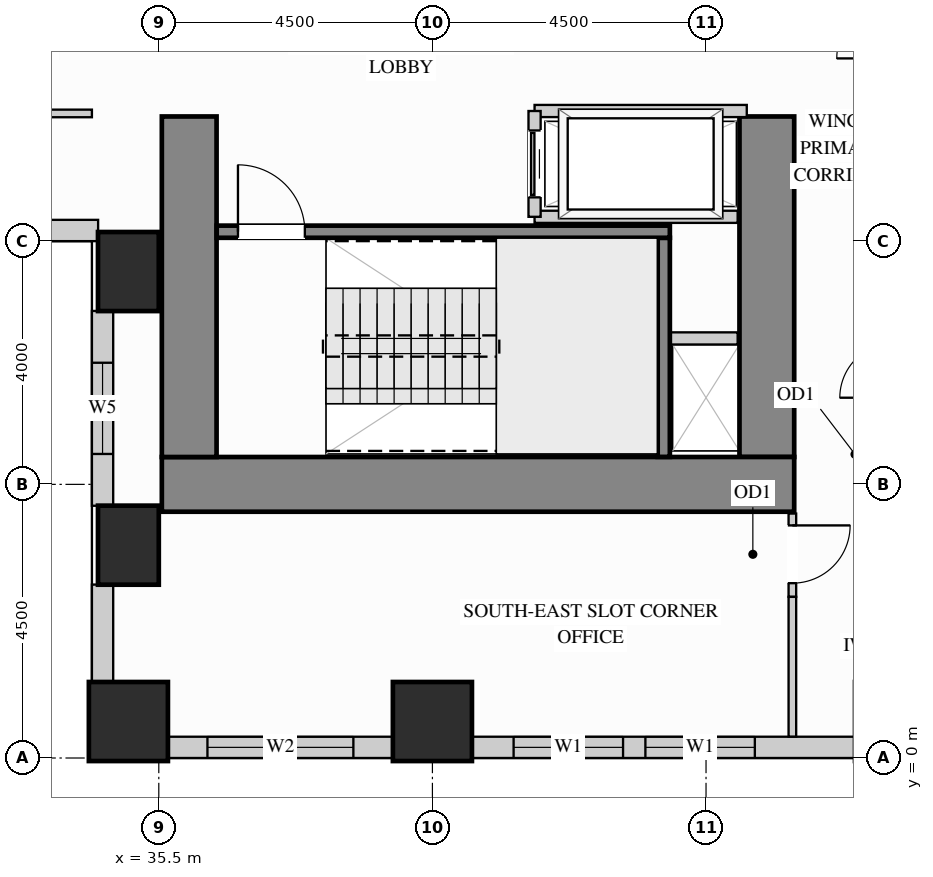
"""IFC4 building model, lengths in metres.
Left out: names, types, materials, properties, quantities, classifications, styles, units other than length and angle.
Written with IfcOpenShell. Run it as: python <this file> out.ifc"""

import sys

from ifc_helpers import new_model, si_unit, direction, frame, frame_2d, origin, origin_2d, place, context, subcontext, project, spatial, rectangle, extrude, source, transform, mapped, element, fill, save


model = new_model("IFC4")
c1 = context("Model", 3, precision=1e-05, world=origin(), true_north=direction((0.0, 1.0)))
c2 = subcontext(c1, "Body", "Model", "MODEL_VIEW")
j1 = project(units=[si_unit("LENGTHUNIT", "METRE"), si_unit("PLANEANGLEUNIT", "RADIAN")], contexts=[c1])
p1 = place(None, origin())
s1 = spatial("IfcSite", under=j1, at=p1, CompositionType="ELEMENT")
p2 = place(p1, origin())
s2 = spatial("IfcBuilding", under=s1, at=p2, CompositionType="ELEMENT")
p3 = place(p2, frame((0.0, 0.0, 36.9)))
s3 = spatial("IfcBuildingStorey", under=s2, at=p3, CompositionType="ELEMENT", Elevation=36.9)
m1 = source(origin(), c2, "Body", "SweptSolid", [
    extrude(rectangle(XDim=1.0, YDim=1.3, at=origin_2d()), origin(), (0.0, 0.0, 1.0), 3.38),
])
for number, where, z_axis, x_axis in (
    (1, (35.0, 3.5, 0.0), (0.0, 0.0, 1.0), (1.0, 0.0, 0.0)),
    (2, (35.0, 8.0, 0.0), (0.0, 0.0, 1.0), (1.0, 0.0, 0.0)),
):
    element("IfcColumn", number, at=place(p3, frame(where, z_axis=z_axis, x_axis=x_axis)), inside=s3, PredefinedType="COLUMN", context=c2, shape_type="MappedRepresentation", body=[
        mapped(m1, transform((0.0, 0.0, 0.0), x_axis=(1.0, 0.0, 0.0), y_axis=(0.0, 1.0, 0.0), z_axis=(0.0, 0.0, 1.0))),
    ])
m2 = source(origin(), c2, "Body", "SweptSolid", [
    extrude(rectangle(XDim=1.3, YDim=1.3, at=origin_2d()), origin(), (0.0, 0.0, 1.0), 3.38),
])
for number, where, z_axis, x_axis in (
    (3, (35.0, 0.6, 0.0), (0.0, 0.0, 1.0), (1.0, 0.0, 0.0)),
    (4, (40.0, 0.6, 0.0), (0.0, 0.0, 1.0), (1.0, 0.0, 0.0)),
):
    element("IfcColumn", number, at=place(p3, frame(where, z_axis=z_axis, x_axis=x_axis)), inside=s3, PredefinedType="COLUMN", context=c2, shape_type="MappedRepresentation", body=[
        mapped(m2, transform((0.0, 0.0, 0.0), x_axis=(1.0, 0.0, 0.0), y_axis=(0.0, 1.0, 0.0), z_axis=(0.0, 0.0, 1.0))),
    ])
m3 = source(origin(), c2, "Body", "SweptSolid", [
    extrude(rectangle(XDim=5.6, YDim=0.9, at=frame_2d((2.8, 0.0))), origin(), (0.0, 0.0, 1.0), 3.38),
])
p4 = place(p3, frame((45.5, 4.95, 0.0), z_axis=(0.0, 0.0, 1.0), x_axis=(0.0, 1.0, 0.0)))
e5 = element("IfcWall", 5, at=p4, inside=s3, PredefinedType="SHEAR", context=c2, shape_type="MappedRepresentation", body=[
    mapped(m3, transform((0.0, 0.0, 0.0), x_axis=(1.0, 0.0, 0.0), y_axis=(0.0, 1.0, 0.0), z_axis=(0.0, 0.0, 1.0))),
])
m4 = source(origin(), c2, "Body", "SweptSolid", [
    extrude(rectangle(XDim=10.4, YDim=0.9, at=frame_2d((5.2, 0.0))), origin(), (0.0, 0.0, 1.0), 3.38),
])
p5 = place(p3, frame((35.55, 4.5, 0.0), z_axis=(0.0, 0.0, 1.0), x_axis=(1.0, 0.0, 0.0)))
e6 = element("IfcWall", 6, at=p5, inside=s3, PredefinedType="SHEAR", context=c2, shape_type="MappedRepresentation", body=[
    mapped(m4, transform((0.0, 0.0, 0.0), x_axis=(1.0, 0.0, 0.0), y_axis=(0.0, 1.0, 0.0), z_axis=(0.0, 0.0, 1.0))),
])
p6 = place(p3, frame((36.0, 4.95, 0.0), z_axis=(0.0, 0.0, 1.0), x_axis=(0.0, 1.0, 0.0)))
e7 = element("IfcWall", 7, at=p6, inside=s3, PredefinedType="SHEAR", context=c2, shape_type="MappedRepresentation", body=[
    mapped(m3, transform((0.0, 0.0, 0.0), x_axis=(1.0, 0.0, 0.0), y_axis=(0.0, 1.0, 0.0), z_axis=(0.0, 0.0, 1.0))),
])
p7 = place(p3, frame((30.998, 8.675, 0.0), z_axis=(0.0, 0.0, 1.0), x_axis=(1.0, 0.0, 0.0)))
e8 = element("IfcWall", 8, at=p7, inside=s3, PredefinedType="SOLIDWALL", context=c2, shape_type="SweptSolid", body=[
    extrude(rectangle(XDim=3.504, YDim=0.35, at=frame_2d((1.752, 0.0))), origin(), (0.0, 0.0, 1.0), 3.365),
])
p8 = place(p7, frame((1.002, 0.0, 0.78)))
e9 = element("IfcOpeningElement", 9, at=p8, cuts=e8, PredefinedType="OPENING", context=c2, shape_type="SweptSolid", body=[
    extrude(rectangle(XDim=1.5, YDim=2.0, at=frame_2d((0.75, 1.0))), frame((0.0, 0.185, 0.0), z_axis=(0.0, -1.0, 0.0), x_axis=(1.0, 0.0, 0.0)), (0.0, 0.0, 1.0), 0.37),
])
p9 = place(p3, frame((34.575, 7.352, 0.0), z_axis=(0.0, 0.0, 1.0), x_axis=(0.0, -1.0, 0.0)))
e10 = element("IfcWall", 10, at=p9, inside=s3, PredefinedType="SOLIDWALL", context=c2, shape_type="SweptSolid", body=[
    extrude(rectangle(XDim=3.204, YDim=0.35, at=frame_2d((1.602, 0.0))), origin(), (0.0, 0.0, 1.0), 2.51),
])
p10 = place(p9, frame((0.852, 0.0, 0.78)))
e11 = element("IfcOpeningElement", 11, at=p10, cuts=e10, PredefinedType="OPENING", context=c2, shape_type="SweptSolid", body=[
    extrude(rectangle(XDim=1.5, YDim=1.55, at=frame_2d((0.75, 0.775))), frame((0.0, 0.185, 0.0), z_axis=(0.0, -1.0, 0.0), x_axis=(1.0, 0.0, 0.0)), (0.0, 0.0, 1.0), 0.37),
])
m5 = source(origin(), c2, "Body", "SweptSolid", [
    extrude(rectangle(XDim=1.604, YDim=0.35, at=frame_2d((0.802, 0.0))), origin(), (0.0, 0.0, 1.0), 2.51),
])
p11 = place(p3, frame((34.575, 2.852, 0.0), z_axis=(0.0, 0.0, 1.0), x_axis=(0.0, -1.0, 0.0)))
e12 = element("IfcWall", 12, at=p11, inside=s3, PredefinedType="SOLIDWALL", context=c2, shape_type="MappedRepresentation", body=[
    mapped(m5, transform((0.0, 0.0, 0.0), x_axis=(1.0, 0.0, 0.0), y_axis=(0.0, 1.0, 0.0), z_axis=(0.0, 0.0, 1.0))),
])
p12 = place(p3, frame((35.648, 0.175, 0.0), z_axis=(0.0, 0.0, 1.0), x_axis=(1.0, 0.0, 0.0)))
e13 = element("IfcWall", 13, at=p12, inside=s3, PredefinedType="SOLIDWALL", context=c2, shape_type="SweptSolid", body=[
    extrude(rectangle(XDim=3.704, YDim=0.35, at=frame_2d((1.852, 0.0))), origin(), (0.0, 0.0, 1.0), 2.51),
])
p13 = place(p12, frame((0.652, 0.0, 0.78)))
e14 = element("IfcOpeningElement", 14, at=p13, cuts=e13, PredefinedType="OPENING", context=c2, shape_type="SweptSolid", body=[
    extrude(rectangle(XDim=2.4, YDim=1.55, at=frame_2d((1.2, 0.775))), frame((0.0, 0.185, 0.0), z_axis=(0.0, -1.0, 0.0), x_axis=(1.0, 0.0, 0.0)), (0.0, 0.0, 1.0), 0.37),
])
p14 = place(p3, frame((40.648, 0.175, 0.0), z_axis=(0.0, 0.0, 1.0), x_axis=(1.0, 0.0, 0.0)))
e15 = element("IfcWall", 15, at=p14, inside=s3, PredefinedType="SOLIDWALL", context=c2, shape_type="SweptSolid", body=[
    extrude(rectangle(XDim=6.304, YDim=0.35, at=frame_2d((3.152, 0.0))), origin(), (0.0, 0.0, 1.0), 2.51),
])
p15 = place(p14, frame((0.687, 0.0, 0.78)))
e16 = element("IfcOpeningElement", 16, at=p15, cuts=e15, PredefinedType="OPENING", context=c2, shape_type="SweptSolid", body=[
    extrude(rectangle(XDim=1.8, YDim=1.55, at=frame_2d((0.9, 0.775))), frame((0.0, 0.185, 0.0), z_axis=(0.0, -1.0, 0.0), x_axis=(1.0, 0.0, 0.0)), (0.0, 0.0, 1.0), 0.37),
])
p16 = place(p14, frame((2.855, 0.0, 0.78)))
e17 = element("IfcOpeningElement", 17, at=p16, cuts=e15, PredefinedType="OPENING", context=c2, shape_type="SweptSolid", body=[
    extrude(rectangle(XDim=1.8, YDim=1.55, at=frame_2d((0.9, 0.775))), frame((0.0, 0.185, 0.0), z_axis=(0.0, -1.0, 0.0), x_axis=(1.0, 0.0, 0.0)), (0.0, 0.0, 1.0), 0.37),
])
p17 = place(p3, frame((45.92, 2.65, 0.0), z_axis=(0.0, 0.0, 1.0), x_axis=(0.0, 1.0, 0.0)))
e18 = element("IfcWall", 18, at=p17, inside=s3, PredefinedType="PARTITIONING", context=c2, shape_type="SweptSolid", body=[
    extrude(rectangle(XDim=1.37, YDim=0.125, at=frame_2d((0.685, 0.0))), origin(), (0.0, 0.0, 1.0), 3.365),
])
p18 = place(p17, frame((0.225, 0.0, 0.0)))
e19 = element("IfcOpeningElement", 19, at=p18, cuts=e18, PredefinedType="OPENING", context=c2, shape_type="SweptSolid", body=[
    extrude(rectangle(XDim=0.95, YDim=2.15, at=frame_2d((0.475, 1.075))), frame((0.0, 0.073, 0.0), z_axis=(0.0, -1.0, 0.0), x_axis=(1.0, 0.0, 0.0)), (0.0, 0.0, 1.0), 0.145),
])
m6 = source(origin(), c2, "Body", "SweptSolid", [
    extrude(rectangle(XDim=2.298, YDim=0.125, at=frame_2d((1.149, 0.0))), origin(), (0.0, 0.0, 1.0), 3.365),
])
p19 = place(p3, frame((45.92, 0.352, 0.0), z_axis=(0.0, 0.0, 1.0), x_axis=(0.0, 1.0, 0.0)))
e20 = element("IfcWall", 20, at=p19, inside=s3, PredefinedType="PARTITIONING", context=c2, shape_type="MappedRepresentation", body=[
    mapped(m6, transform((0.0, 0.0, 0.0), x_axis=(1.0, 0.0, 0.0), y_axis=(0.0, 1.0, 0.0), z_axis=(0.0, 0.0, 1.0))),
])
p20 = place(p3, frame((29.85, 10.6, 0.0), z_axis=(0.0, 0.0, 1.0), x_axis=(1.0, 0.0, 0.0)))
e21 = element("IfcWall", 21, at=p20, inside=s3, PredefinedType="PARTITIONING", context=c2, shape_type="SweptSolid", body=[
    extrude(rectangle(XDim=4.55, YDim=0.125, at=frame_2d((2.275, 0.0))), origin(), (0.0, 0.0, 1.0), 3.365),
])
p21 = place(p20, frame((1.8, 0.0, 0.0)))
e22 = element("IfcOpeningElement", 22, at=p21, cuts=e21, PredefinedType="OPENING", context=c2, shape_type="SweptSolid", body=[
    extrude(rectangle(XDim=0.95, YDim=2.15, at=frame_2d((0.475, 1.075))), frame((0.0, 0.073, 0.0), z_axis=(0.0, -1.0, 0.0), x_axis=(1.0, 0.0, 0.0)), (0.0, 0.0, 1.0), 0.145),
])
m7 = source(origin(), c2, "Body", "SweptSolid", [
    extrude(rectangle(XDim=1.17, YDim=0.2, at=frame_2d((0.585, 0.0))), origin(), (0.0, 0.0, 1.0), 3.365),
])
p22 = place(p3, frame((43.85, 6.9, 0.0), z_axis=(0.0, 0.0, 1.0), x_axis=(1.0, 0.0, 0.0)))
e23 = element("IfcWall", 23, at=p22, inside=s3, PredefinedType="PARTITIONING", context=c2, shape_type="MappedRepresentation", body=[
    mapped(m7, transform((0.0, 0.0, 0.0), x_axis=(1.0, 0.0, 0.0), y_axis=(0.0, 1.0, 0.0), z_axis=(0.0, 0.0, 1.0))),
])
m8 = source(origin(), c2, "Body", "SweptSolid", [
    extrude(rectangle(XDim=3.49, YDim=0.2, at=frame_2d((1.745, 0.0))), origin(), (0.0, 0.0, 1.0), 3.365),
])
p23 = place(p3, frame((41.68, 10.64, 0.0), z_axis=(0.0, 0.0, 1.0), x_axis=(1.0, 0.0, 0.0)))
e24 = element("IfcWall", 24, at=p23, inside=s3, PredefinedType="PARTITIONING", context=c2, shape_type="MappedRepresentation", body=[
    mapped(m8, transform((0.0, 0.0, 0.0), x_axis=(1.0, 0.0, 0.0), y_axis=(0.0, 1.0, 0.0), z_axis=(0.0, 0.0, 1.0))),
])
m9 = source(origin(), c2, "Body", "SweptSolid", [
    extrude(rectangle(XDim=3.34, YDim=0.2, at=frame_2d((1.67, 0.0))), origin(), (0.0, 0.0, 1.0), 3.365),
])
p24 = place(p3, frame((41.68, 8.9, 0.0), z_axis=(0.0, 0.0, 1.0), x_axis=(1.0, 0.0, 0.0)))
e25 = element("IfcWall", 25, at=p24, inside=s3, PredefinedType="PARTITIONING", context=c2, shape_type="MappedRepresentation", body=[
    mapped(m9, transform((0.0, 0.0, 0.0), x_axis=(1.0, 0.0, 0.0), y_axis=(0.0, 1.0, 0.0), z_axis=(0.0, 0.0, 1.0))),
])
p25 = place(p3, frame((41.68, 8.9, 0.0), z_axis=(0.0, 0.0, 1.0), x_axis=(0.0, 1.0, 0.0)))
e26 = element("IfcWall", 26, at=p25, inside=s3, PredefinedType="PARTITIONING", context=c2, shape_type="SweptSolid", body=[
    extrude(rectangle(XDim=1.74, YDim=0.2, at=frame_2d((0.87, 0.0))), origin(), (0.0, 0.0, 1.0), 3.365),
])
p26 = place(p25, frame((0.32, 0.0, 0.0)))
e27 = element("IfcOpeningElement", 27, at=p26, cuts=e26, PredefinedType="OPENING", context=c2, shape_type="SweptSolid", body=[
    extrude(rectangle(XDim=1.1, YDim=2.2, at=frame_2d((0.55, 1.1))), frame((0.0, 0.11, 0.0), z_axis=(0.0, -1.0, 0.0), x_axis=(1.0, 0.0, 0.0)), (0.0, 0.0, 1.0), 0.22),
])
m10 = source(origin(), c2, "Body", "SweptSolid", [
    extrude(rectangle(XDim=3.603, YDim=0.2, at=frame_2d((1.802, 0.0))), origin(), (0.0, 0.0, 1.0), 3.38),
])
p27 = place(p3, frame((43.805, 4.952, 0.0), z_axis=(0.0, 0.0, 1.0), x_axis=(0.0, 1.0, 0.0)))
e28 = element("IfcWall", 28, at=p27, inside=s3, PredefinedType="SHEAR", context=c2, shape_type="MappedRepresentation", body=[
    mapped(m10, transform((0.0, 0.0, 0.0), x_axis=(1.0, 0.0, 0.0), y_axis=(0.0, 1.0, 0.0), z_axis=(0.0, 0.0, 1.0))),
])
p28 = place(p3, frame((36.452, 8.655, 0.0), z_axis=(0.0, 0.0, 1.0), x_axis=(1.0, 0.0, 0.0)))
e29 = element("IfcWall", 29, at=p28, inside=s3, PredefinedType="SHEAR", context=c2, shape_type="SweptSolid", body=[
    extrude(rectangle(XDim=7.453, YDim=0.2, at=frame_2d((3.727, 0.0))), origin(), (0.0, 0.0, 1.0), 3.38),
])
p29 = place(p28, frame((0.35, 0.0, 0.0)))
e30 = element("IfcOpeningElement", 30, at=p29, cuts=e29, PredefinedType="OPENING", context=c2, shape_type="SweptSolid", body=[
    extrude(rectangle(XDim=1.1, YDim=2.15, at=frame_2d((0.55, 1.075))), frame((0.0, 0.11, 0.0), z_axis=(0.0, -1.0, 0.0), x_axis=(1.0, 0.0, 0.0)), (0.0, 0.0, 1.0), 0.22),
])
m11 = source(origin(), c2, "Body", "SweptSolid", [
    extrude(rectangle(XDim=1.1, YDim=2.2, at=frame_2d((0.55, 1.1))), frame((0.0, 0.025, 0.0), z_axis=(0.0, -1.0, 0.0), x_axis=(1.0, 0.0, 0.0)), (0.0, 0.0, 1.0), 0.05),
])
p30 = place(p26, origin())
e31 = element("IfcDoor", 31, at=p30, inside=s3, OperationType="SLIDING_TO_LEFT", PredefinedType="DOOR", context=c2, shape_type="MappedRepresentation", body=[
    mapped(m11, transform((0.0, 0.0, 0.0), x_axis=(1.0, 0.0, 0.0), y_axis=(0.0, 1.0, 0.0), z_axis=(0.0, 0.0, 1.0))),
])
fill(e27, e31)
m12 = source(origin(), c2, "Body", "SweptSolid", [
    extrude(rectangle(XDim=0.95, YDim=2.15, at=frame_2d((0.475, 1.075))), frame((0.0, 0.025, 0.0), z_axis=(0.0, -1.0, 0.0), x_axis=(1.0, 0.0, 0.0)), (0.0, 0.0, 1.0), 0.05),
])
p31 = place(p18, origin())
e32 = element("IfcDoor", 32, at=p31, inside=s3, OperationType="SINGLE_SWING_RIGHT", PredefinedType="DOOR", context=c2, shape_type="MappedRepresentation", body=[
    mapped(m12, transform((0.0, 0.0, 0.0), x_axis=(1.0, 0.0, 0.0), y_axis=(0.0, 1.0, 0.0), z_axis=(0.0, 0.0, 1.0))),
])
fill(e19, e32)
m13 = source(origin(), c2, "Body", "SweptSolid", [
    extrude(rectangle(XDim=1.1, YDim=2.15, at=frame_2d((0.55, 1.075))), frame((0.0, 0.025, 0.0), z_axis=(0.0, -1.0, 0.0), x_axis=(1.0, 0.0, 0.0)), (0.0, 0.0, 1.0), 0.05),
])
p32 = place(p29, origin())
e33 = element("IfcDoor", 33, at=p32, inside=s3, OperationType="SINGLE_SWING_LEFT", PredefinedType="DOOR", context=c2, shape_type="MappedRepresentation", body=[
    mapped(m13, transform((0.0, 0.0, 0.0), x_axis=(1.0, 0.0, 0.0), y_axis=(0.0, 1.0, 0.0), z_axis=(0.0, 0.0, 1.0))),
])
fill(e30, e33)
m14 = source(origin(), c2, "Body", "SweptSolid", [
    extrude(rectangle(XDim=1.8, YDim=1.55, at=frame_2d((0.9, 0.775))), frame((0.0, 0.03, 0.0), z_axis=(0.0, -1.0, 0.0), x_axis=(1.0, 0.0, 0.0)), (0.0, 0.0, 1.0), 0.06),
])
p33 = place(p15, origin())
e34 = element("IfcWindow", 34, at=p33, inside=s3, PartitioningType="SINGLE_PANEL", PredefinedType="WINDOW", context=c2, shape_type="MappedRepresentation", body=[
    mapped(m14, transform((0.0, 0.0, 0.0), x_axis=(1.0, 0.0, 0.0), y_axis=(0.0, 1.0, 0.0), z_axis=(0.0, 0.0, 1.0))),
])
fill(e16, e34)
p34 = place(p16, origin())
e35 = element("IfcWindow", 35, at=p34, inside=s3, PartitioningType="SINGLE_PANEL", PredefinedType="WINDOW", context=c2, shape_type="MappedRepresentation", body=[
    mapped(m14, transform((0.0, 0.0, 0.0), x_axis=(1.0, 0.0, 0.0), y_axis=(0.0, 1.0, 0.0), z_axis=(0.0, 0.0, 1.0))),
])
fill(e17, e35)
m15 = source(origin(), c2, "Body", "SweptSolid", [
    extrude(rectangle(XDim=2.4, YDim=1.55, at=frame_2d((1.2, 0.775))), frame((0.0, 0.03, 0.0), z_axis=(0.0, -1.0, 0.0), x_axis=(1.0, 0.0, 0.0)), (0.0, 0.0, 1.0), 0.06),
])
p35 = place(p13, origin())
e36 = element("IfcWindow", 36, at=p35, inside=s3, PartitioningType="SINGLE_PANEL", PredefinedType="WINDOW", context=c2, shape_type="MappedRepresentation", body=[
    mapped(m15, transform((0.0, 0.0, 0.0), x_axis=(1.0, 0.0, 0.0), y_axis=(0.0, 1.0, 0.0), z_axis=(0.0, 0.0, 1.0))),
])
fill(e14, e36)
m16 = source(origin(), c2, "Body", "SweptSolid", [
    extrude(rectangle(XDim=1.5, YDim=1.55, at=frame_2d((0.75, 0.775))), frame((0.0, 0.03, 0.0), z_axis=(0.0, -1.0, 0.0), x_axis=(1.0, 0.0, 0.0)), (0.0, 0.0, 1.0), 0.06),
])
p36 = place(p10, origin())
e37 = element("IfcWindow", 37, at=p36, inside=s3, PartitioningType="SINGLE_PANEL", PredefinedType="WINDOW", context=c2, shape_type="MappedRepresentation", body=[
    mapped(m16, transform((0.0, 0.0, 0.0), x_axis=(1.0, 0.0, 0.0), y_axis=(0.0, 1.0, 0.0), z_axis=(0.0, 0.0, 1.0))),
])
fill(e11, e37)
save(model, sys.argv[1])
